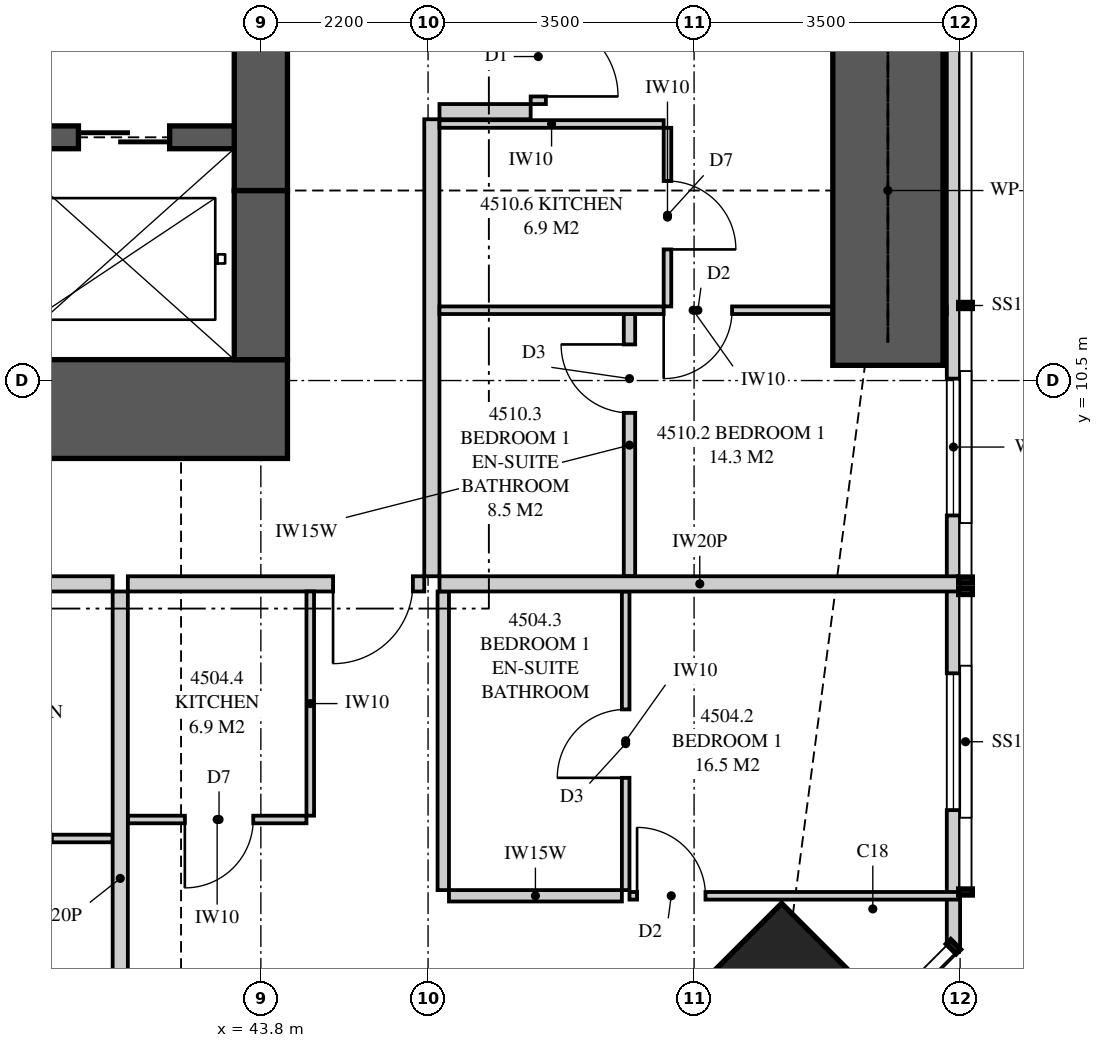
"""IFC4 building model, lengths in metres.
Left out: names, types, materials, properties, quantities, classifications, styles, units other than length and angle.
Written with IfcOpenShell. Run it as: python <this file> out.ifc"""

import sys

from ifc_helpers import new_model, si_unit, direction, frame, frame_2d, origin, origin_2d, place, context, subcontext, project, spatial, polyline, rectangle, outline, extrude, element, fill, save


model = new_model("IFC4")
c1 = context("Model", 3, precision=1e-05, world=origin(), true_north=direction((0.0, 1.0)))
c2 = subcontext(c1, "Body", "Model", "MODEL_VIEW")
j1 = project(units=[si_unit("LENGTHUNIT", "METRE"), si_unit("PLANEANGLEUNIT", "RADIAN")], contexts=[c1])
p1 = place(None, origin())
s1 = spatial("IfcSite", under=j1, at=p1, CompositionType="ELEMENT")
p2 = place(p1, origin())
s2 = spatial("IfcBuilding", under=s1, at=p2, CompositionType="ELEMENT")
p3 = place(p2, frame((0.0, 0.0, 167.75)))
s3 = spatial("IfcBuildingStorey", under=s2, at=p3, CompositionType="ELEMENT", Elevation=167.75)
p4 = place(p3, frame((50.652, 2.348, 0.0), z_axis=(0.0, 0.0, 1.0), x_axis=(0.707106781187, 0.707106781187, 0.0)))
e1 = element("IfcColumn", 1, at=p4, inside=s3, PredefinedType="COLUMN", context=c2, shape_type="SweptSolid", body=[
    extrude(rectangle(XDim=1.8, YDim=1.8, at=origin_2d()), origin(), (0.0, 0.0, 1.0), 3.35),
])
p5 = place(p3, frame((35.9, 10.125, 0.0), z_axis=(0.0, 0.0, 1.0), x_axis=(1.0, 0.0, 0.0)))
e2 = element("IfcWall", 2, at=p5, inside=s3, PredefinedType="SHEAR", context=c2, shape_type="SweptSolid", body=[
    extrude(rectangle(XDim=8.25, YDim=1.3, at=frame_2d((4.125, 0.0))), origin(), (0.0, 0.0, 1.0), 3.35),
])
p6 = place(p5, frame((2.7, 0.0, 0.0)))
e3 = element("IfcOpeningElement", 3, at=p6, cuts=e2, PredefinedType="OPENING", context=c2, shape_type="SweptSolid", body=[
    extrude(rectangle(XDim=1.0, YDim=2.1, at=frame_2d((0.5, 1.05))), frame((0.0, 0.66, 0.0), z_axis=(0.0, -1.0, 0.0), x_axis=(1.0, 0.0, 0.0)), (0.0, 0.0, 1.0), 1.32),
])
p7 = place(p3, frame((43.8, 10.775, 0.0), z_axis=(0.0, 0.0, 1.0), x_axis=(0.0, 1.0, 0.0)))
e4 = element("IfcWall", 4, at=p7, inside=s3, PredefinedType="SHEAR", context=c2, shape_type="SweptSolid", body=[
    extrude(rectangle(XDim=2.225, YDim=0.7, at=frame_2d((1.113, 0.0))), origin(), (0.0, 0.0, 1.0), 3.35),
])
p8 = place(p3, frame((43.8, 13.0, 0.0), z_axis=(0.0, 0.0, 1.0), x_axis=(0.0, 1.0, 0.0)))
e5 = element("IfcWall", 5, at=p8, inside=s3, PredefinedType="SHEAR", context=c2, shape_type="SweptSolid", body=[
    extrude(rectangle(XDim=6.3, YDim=0.7, at=frame_2d((3.15, 0.0))), origin(), (0.0, 0.0, 1.0), 3.35),
])
p9 = place(p8, frame((4.1, 0.0, 0.0)))
e6 = element("IfcOpeningElement", 6, at=p9, cuts=e5, PredefinedType="OPENING", context=c2, shape_type="SweptSolid", body=[
    extrude(rectangle(XDim=1.2, YDim=2.2, at=frame_2d((0.6, 1.1))), frame((0.0, 0.36, 0.0), z_axis=(0.0, -1.0, 0.0), x_axis=(1.0, 0.0, 0.0)), (0.0, 0.0, 1.0), 0.72),
])
p10 = place(p3, frame((40.2, 13.7, 0.0), z_axis=(0.0, 0.0, 1.0), x_axis=(1.0, 0.0, 0.0)))
e7 = element("IfcWall", 7, at=p10, inside=s3, PredefinedType="SHEAR", context=c2, shape_type="SweptSolid", body=[
    extrude(rectangle(XDim=3.6, YDim=0.3, at=frame_2d((1.8, 0.0))), origin(), (0.0, 0.0, 1.0), 3.35),
])
p11 = place(p10, frame((1.2, 0.0, 0.0)))
e8 = element("IfcOpeningElement", 8, at=p11, cuts=e7, PredefinedType="OPENING", context=c2, shape_type="SweptSolid", body=[
    extrude(rectangle(XDim=1.2, YDim=2.1, at=frame_2d((0.6, 1.05))), frame((0.0, 0.16, 0.0), z_axis=(0.0, -1.0, 0.0), x_axis=(1.0, 0.0, 0.0)), (0.0, 0.0, 1.0), 0.32),
])
p12 = place(p3, frame((52.913, 3.051, 0.0), z_axis=(0.0, 0.0, 1.0), x_axis=(0.0, 1.0, 0.0)))
e9 = element("IfcWall", 9, at=p12, inside=s3, PredefinedType="SOLIDWALL", context=c2, shape_type="SweptSolid", body=[
    extrude(outline(polyline([(0.0, 0.0), (29.897, 0.0), (29.897, 3.11), (22.167, 3.11), (22.167, 2.15), (22.074, 2.15), (22.074, 3.11), (21.949, 3.11), (21.949, 2.15), (9.949, 2.15), (9.949, 3.11), (9.847, 3.11), (9.847, 2.15), (9.706, 2.15), (9.706, 3.11), (0.0, 3.11), (0.0, 0.0)])), frame((0.0, 0.087, 0.0), z_axis=(0.0, -1.0, 0.0), x_axis=(1.0, 0.0, 0.0)), (0.0, 0.0, 1.0), 0.175),
])
p13 = place(p12, frame((1.797, 0.0, 0.4)))
e10 = element("IfcOpeningElement", 10, at=p13, cuts=e9, PredefinedType="OPENING", context=c2, shape_type="SweptSolid", body=[
    extrude(rectangle(XDim=1.8, YDim=1.7, at=frame_2d((0.9, 0.85))), frame((0.0, 0.097, 0.0), z_axis=(0.0, -1.0, 0.0), x_axis=(1.0, 0.0, 0.0)), (0.0, 0.0, 1.0), 0.195),
])
p14 = place(p12, frame((5.674, 0.0, 0.4)))
e11 = element("IfcOpeningElement", 11, at=p14, cuts=e9, PredefinedType="OPENING", context=c2, shape_type="SweptSolid", body=[
    extrude(rectangle(XDim=1.8, YDim=1.7, at=frame_2d((0.9, 0.85))), frame((0.0, 0.097, 0.0), z_axis=(0.0, -1.0, 0.0), x_axis=(1.0, 0.0, 0.0)), (0.0, 0.0, 1.0), 0.195),
])
p15 = place(p12, frame((12.349, 0.0, 0.4)))
e12 = element("IfcOpeningElement", 12, at=p15, cuts=e9, PredefinedType="OPENING", context=c2, shape_type="SweptSolid", body=[
    extrude(rectangle(XDim=2.4, YDim=1.7, at=frame_2d((1.2, 0.85))), frame((0.0, 0.097, 0.0), z_axis=(0.0, -1.0, 0.0), x_axis=(1.0, 0.0, 0.0)), (0.0, 0.0, 1.0), 0.195),
])
p16 = place(p12, frame((15.274, 0.0, 0.0)))
e13 = element("IfcOpeningElement", 13, at=p16, cuts=e9, PredefinedType="OPENING", context=c2, shape_type="SweptSolid", body=[
    extrude(rectangle(XDim=1.8, YDim=2.1, at=frame_2d((0.9, 1.05))), frame((0.0, 0.097, 0.0), z_axis=(0.0, -1.0, 0.0), x_axis=(1.0, 0.0, 0.0)), (0.0, 0.0, 1.0), 0.195),
])
p17 = place(p12, frame((24.373, 0.0, 0.4)))
e14 = element("IfcOpeningElement", 14, at=p17, cuts=e9, PredefinedType="OPENING", context=c2, shape_type="SweptSolid", body=[
    extrude(rectangle(XDim=1.2, YDim=1.7, at=frame_2d((0.6, 0.85))), frame((0.0, 0.097, 0.0), z_axis=(0.0, -1.0, 0.0), x_axis=(1.0, 0.0, 0.0)), (0.0, 0.0, 1.0), 0.195),
])
p18 = place(p12, frame((26.801, 0.0, 0.4)))
e15 = element("IfcOpeningElement", 15, at=p18, cuts=e9, PredefinedType="OPENING", context=c2, shape_type="SweptSolid", body=[
    extrude(rectangle(XDim=1.8, YDim=1.7, at=frame_2d((0.9, 0.85))), frame((0.0, 0.097, 0.0), z_axis=(0.0, -1.0, 0.0), x_axis=(1.0, 0.0, 0.0)), (0.0, 0.0, 1.0), 0.195),
])
p19 = place(p3, frame((41.95, 0.175, 0.0), z_axis=(0.0, 0.0, 1.0), x_axis=(0.0, 1.0, 0.0)))
e16 = element("IfcWall", 16, at=p19, inside=s3, PredefinedType="PARTITIONING", context=c2, shape_type="SweptSolid", body=[
    extrude(outline(polyline([(0.529, 2.15), (0.0, 2.15), (0.0, 0.0), (0.529, 0.0), (0.529, 0.876), (1.021, 0.876), (1.021, 0.0), (7.55, 0.0), (7.55, 3.11), (1.685, 3.11), (1.685, 2.15), (1.021, 2.15), (1.021, 1.274), (0.529, 1.274), (0.529, 2.15)])), frame((0.0, 0.1, 0.0), z_axis=(0.0, -1.0, 0.0), x_axis=(1.0, 0.0, 0.0)), (0.0, 0.0, 1.0), 0.2),
])
p20 = place(p3, frame((42.05, 7.825, 0.0), z_axis=(0.0, 0.0, 1.0), x_axis=(1.0, 0.0, 0.0)))
e17 = element("IfcWall", 17, at=p20, inside=s3, PredefinedType="PARTITIONING", context=c2, shape_type="SweptSolid", body=[
    extrude(outline(polyline([(0.0, 0.0), (3.9, 0.0), (3.9, 3.11), (1.037, 3.11), (1.037, 2.541), (0.363, 2.541), (0.363, 3.11), (0.0, 3.11), (0.0, 0.0)])), frame((0.0, 0.1, 0.0), z_axis=(0.0, -1.0, 0.0), x_axis=(1.0, 0.0, 0.0)), (0.0, 0.0, 1.0), 0.2),
])
p21 = place(p20, frame((2.7, 0.0, 0.0)))
e18 = element("IfcOpeningElement", 18, at=p21, cuts=e17, PredefinedType="OPENING", context=c2, shape_type="SweptSolid", body=[
    extrude(rectangle(XDim=1.05, YDim=2.2, at=frame_2d((0.525, 1.1))), frame((0.0, 0.11, 0.0), z_axis=(0.0, -1.0, 0.0), x_axis=(1.0, 0.0, 0.0)), (0.0, 0.0, 1.0), 0.22),
])
p22 = place(p3, frame((48.6, 3.796, 0.0), z_axis=(0.0, 0.0, 1.0), x_axis=(0.0, 1.0, 0.0)))
e19 = element("IfcWall", 19, at=p22, inside=s3, PredefinedType="PARTITIONING", context=c2, shape_type="SweptSolid", body=[
    extrude(rectangle(XDim=3.929, YDim=0.1, at=frame_2d((1.964, 0.0))), origin(), (0.0, 0.0, 1.0), 3.11),
])
p23 = place(p22, frame((1.477, 0.0, 0.0)))
e20 = element("IfcOpeningElement", 20, at=p23, cuts=e19, PredefinedType="OPENING", context=c2, shape_type="SweptSolid", body=[
    extrude(rectangle(XDim=0.9, YDim=2.1, at=frame_2d((0.45, 1.05))), frame((0.0, 0.06, 0.0), z_axis=(0.0, -1.0, 0.0), x_axis=(1.0, 0.0, 0.0)), (0.0, 0.0, 1.0), 0.12),
])
p24 = place(p3, frame((48.65, 3.721, 0.0), z_axis=(0.0, 0.0, 1.0), x_axis=(1.0, 0.0, 0.0)))
e21 = element("IfcWall", 21, at=p24, inside=s3, PredefinedType="PARTITIONING", context=c2, shape_type="SweptSolid", body=[
    extrude(outline(polyline([(0.0, 0.0), (4.35, 0.0), (4.35, 3.11), (3.049, 3.11), (3.049, 2.15), (1.314, 2.15), (1.314, 3.11), (0.0, 3.11), (0.0, 0.0)])), frame((0.0, 0.05, 0.0), z_axis=(0.0, -1.0, 0.0), x_axis=(1.0, 0.0, 0.0)), (0.0, 0.0, 1.0), 0.1),
])
p25 = place(p24, frame((0.1, 0.0, 0.0)))
e22 = element("IfcOpeningElement", 22, at=p25, cuts=e21, PredefinedType="OPENING", context=c2, shape_type="SweptSolid", body=[
    extrude(rectangle(XDim=0.9, YDim=2.1, at=frame_2d((0.45, 1.05))), frame((0.0, 0.06, 0.0), z_axis=(0.0, -1.0, 0.0), x_axis=(1.0, 0.0, 0.0)), (0.0, 0.0, 1.0), 0.12),
])
p26 = place(p3, frame((46.275, 3.721, 0.0), z_axis=(0.0, 0.0, 1.0), x_axis=(1.0, 0.0, 0.0)))
e23 = element("IfcWall", 23, at=p26, inside=s3, PredefinedType="PLUMBINGWALL", context=c2, shape_type="SweptSolid", body=[
    extrude(rectangle(XDim=2.275, YDim=0.15, at=frame_2d((1.138, 0.0))), origin(), (0.0, 0.0, 1.0), 3.11),
])
p27 = place(p3, frame((46.2, 3.796, 0.0), z_axis=(0.0, 0.0, 1.0), x_axis=(0.0, 1.0, 0.0)))
e24 = element("IfcWall", 24, at=p27, inside=s3, PredefinedType="PLUMBINGWALL", context=c2, shape_type="SweptSolid", body=[
    extrude(rectangle(XDim=3.929, YDim=0.15, at=frame_2d((1.964, 0.0))), origin(), (0.0, 0.0, 1.0), 3.11),
])
p28 = place(p3, frame((42.05, 4.725, 0.0), z_axis=(0.0, 0.0, 1.0), x_axis=(1.0, 0.0, 0.0)))
e25 = element("IfcWall", 25, at=p28, inside=s3, PredefinedType="PARTITIONING", context=c2, shape_type="SweptSolid", body=[
    extrude(outline(polyline([(0.0, 0.0), (2.35, 0.0), (2.35, 3.11), (0.987, 3.11), (0.987, 2.541), (0.413, 2.541), (0.413, 3.11), (0.0, 3.11), (0.0, 0.0)])), frame((0.0, 0.05, 0.0), z_axis=(0.0, -1.0, 0.0), x_axis=(1.0, 0.0, 0.0)), (0.0, 0.0, 1.0), 0.1),
])
p29 = place(p28, frame((0.75, 0.0, 0.0)))
e26 = element("IfcOpeningElement", 26, at=p29, cuts=e25, PredefinedType="OPENING", context=c2, shape_type="SweptSolid", body=[
    extrude(rectangle(XDim=0.9, YDim=2.1, at=frame_2d((0.45, 1.05))), frame((0.0, 0.06, 0.0), z_axis=(0.0, -1.0, 0.0), x_axis=(1.0, 0.0, 0.0)), (0.0, 0.0, 1.0), 0.12),
])
p30 = place(p3, frame((44.45, 4.775, 0.0), z_axis=(0.0, 0.0, 1.0), x_axis=(0.0, 1.0, 0.0)))
e27 = element("IfcWall", 27, at=p30, inside=s3, PredefinedType="PARTITIONING", context=c2, shape_type="SweptSolid", body=[
    extrude(rectangle(XDim=2.95, YDim=0.1, at=frame_2d((1.475, 0.0))), origin(), (0.0, 0.0, 1.0), 3.11),
])
p31 = place(p3, frame((46.15, 7.825, 0.0), z_axis=(0.0, 0.0, 1.0), x_axis=(1.0, 0.0, 0.0)))
e28 = element("IfcWall", 28, at=p31, inside=s3, PredefinedType="PARTITIONING", context=c2, shape_type="SweptSolid", body=[
    extrude(outline(polyline([(0.0, 0.0), (6.85, 0.0), (6.85, 3.11), (6.138, 3.11), (6.138, 2.15), (4.303, 2.15), (4.303, 3.11), (0.0, 3.11), (0.0, 0.0)])), frame((0.0, 0.1, 0.0), z_axis=(0.0, -1.0, 0.0), x_axis=(1.0, 0.0, 0.0)), (0.0, 0.0, 1.0), 0.2),
])
p32 = place(p3, frame((46.05, 7.925, 0.0), z_axis=(0.0, 0.0, 1.0), x_axis=(0.0, 1.0, 0.0)))
e29 = element("IfcWall", 29, at=p32, inside=s3, PredefinedType="PARTITIONING", context=c2, shape_type="SweptSolid", body=[
    extrude(outline(polyline([(0.0, 0.0), (6.012, 0.0), (6.012, 3.11), (5.412, 3.11), (5.412, 2.541), (4.738, 2.541), (4.738, 3.11), (0.0, 3.11), (0.0, 0.0)])), frame((0.0, 0.1, 0.0), z_axis=(0.0, -1.0, 0.0), x_axis=(1.0, 0.0, 0.0)), (0.0, 0.0, 1.0), 0.2),
])
p33 = place(p3, frame((52.825, 11.425, 0.0), z_axis=(0.0, 0.0, 1.0), x_axis=(-1.0, 0.0, 0.0)))
e30 = element("IfcWall", 30, at=p33, inside=s3, PredefinedType="PARTITIONING", context=c2, shape_type="SweptSolid", body=[
    extrude(outline(polyline([(0.115, 3.11), (0.0, 3.11), (0.0, 0.0), (0.529, 0.0), (0.529, 0.186), (1.021, 0.186), (1.021, 0.0), (6.675, 0.0), (6.675, 3.11), (1.849, 3.11), (1.849, 2.15), (1.021, 2.15), (1.021, 1.965), (0.529, 1.965), (0.529, 2.15), (0.115, 2.15), (0.115, 3.11)])), frame((0.0, 0.05, 0.0), z_axis=(0.0, -1.0, 0.0), x_axis=(1.0, 0.0, 0.0)), (0.0, 0.0, 1.0), 0.1),
])
p34 = place(p33, frame((2.825, 0.0, 0.0)))
e31 = element("IfcOpeningElement", 31, at=p34, cuts=e30, PredefinedType="OPENING", context=c2, shape_type="SweptSolid", body=[
    extrude(rectangle(XDim=0.9, YDim=2.1, at=frame_2d((0.45, 1.05))), frame((0.0, 0.06, 0.0), z_axis=(0.0, -1.0, 0.0), x_axis=(1.0, 0.0, 0.0)), (0.0, 0.0, 1.0), 0.12),
])
p35 = place(p3, frame((48.65, 7.925, 0.0), z_axis=(0.0, 0.0, 1.0), x_axis=(0.0, 1.0, 0.0)))
e32 = element("IfcWall", 32, at=p35, inside=s3, PredefinedType="PLUMBINGWALL", context=c2, shape_type="SweptSolid", body=[
    extrude(rectangle(XDim=3.45, YDim=0.15, at=frame_2d((1.725, 0.0))), origin(), (0.0, 0.0, 1.0), 3.11),
])
p36 = place(p35, frame((2.15, 0.0, 0.0)))
e33 = element("IfcOpeningElement", 33, at=p36, cuts=e32, PredefinedType="OPENING", context=c2, shape_type="SweptSolid", body=[
    extrude(rectangle(XDim=0.9, YDim=2.1, at=frame_2d((0.45, 1.05))), frame((0.0, 0.085, 0.0), z_axis=(0.0, -1.0, 0.0), x_axis=(1.0, 0.0, 0.0)), (0.0, 0.0, 1.0), 0.17),
])
p37 = place(p3, frame((49.15, 11.475, 0.0), z_axis=(0.0, 0.0, 1.0), x_axis=(0.0, 1.0, 0.0)))
e34 = element("IfcWall", 34, at=p37, inside=s3, PredefinedType="PARTITIONING", context=c2, shape_type="SweptSolid", body=[
    extrude(outline(polyline([(0.0, 0.0), (2.35, 0.0), (2.35, 3.11), (1.812, 3.11), (1.812, 2.541), (1.238, 2.541), (1.238, 3.11), (0.0, 3.11), (0.0, 0.0)])), frame((0.0, 0.05, 0.0), z_axis=(0.0, -1.0, 0.0), x_axis=(1.0, 0.0, 0.0)), (0.0, 0.0, 1.0), 0.1),
])
p38 = place(p37, frame((0.75, 0.0, 0.0)))
e35 = element("IfcOpeningElement", 35, at=p38, cuts=e34, PredefinedType="OPENING", context=c2, shape_type="SweptSolid", body=[
    extrude(rectangle(XDim=0.9, YDim=2.1, at=frame_2d((0.45, 1.05))), frame((0.0, 0.06, 0.0), z_axis=(0.0, -1.0, 0.0), x_axis=(1.0, 0.0, 0.0)), (0.0, 0.0, 1.0), 0.12),
])
p39 = place(p3, frame((49.1, 13.875, 0.0), z_axis=(0.0, 0.0, 1.0), x_axis=(-1.0, 0.0, 0.0)))
e36 = element("IfcWall", 36, at=p39, inside=s3, PredefinedType="PARTITIONING", context=c2, shape_type="SweptSolid", body=[
    extrude(rectangle(XDim=2.95, YDim=0.1, at=frame_2d((1.475, 0.0))), origin(), (0.0, 0.0, 1.0), 3.11),
])
p40 = place(p3, frame((39.175, 7.825, 0.0), z_axis=(0.0, 0.0, 1.0), x_axis=(1.0, 0.0, 0.0)))
e37 = element("IfcWall", 37, at=p40, inside=s3, PredefinedType="PARTITIONING", context=c2, shape_type="SweptSolid", body=[
    extrude(rectangle(XDim=2.675, YDim=0.2, at=frame_2d((1.337, 0.0))), origin(), (0.0, 0.0, 1.0), 3.11),
])
p41 = place(p3, frame((47.45, 14.137, 0.0), z_axis=(0.0, 0.0, 1.0), x_axis=(0.0, 1.0, 0.0)))
e38 = element("IfcWall", 38, at=p41, inside=s3, PredefinedType="PARTITIONING", context=c2, shape_type="SweptSolid", body=[
    extrude(rectangle(XDim=2.4, YDim=0.2, at=frame_2d((1.2, 0.0))), origin(), (0.0, 0.0, 1.0), 3.11),
])
p42 = place(p41, frame((0.1, 0.0, 0.0)))
e39 = element("IfcOpeningElement", 39, at=p42, cuts=e38, PredefinedType="OPENING", context=c2, shape_type="SweptSolid", body=[
    extrude(rectangle(XDim=1.05, YDim=2.2, at=frame_2d((0.525, 1.1))), frame((0.0, 0.11, 0.0), z_axis=(0.0, -1.0, 0.0), x_axis=(1.0, 0.0, 0.0)), (0.0, 0.0, 1.0), 0.22),
])
p43 = place(p3, frame((46.15, 14.038, 0.0), z_axis=(0.0, 0.0, 1.0), x_axis=(1.0, 0.0, 0.0)))
e40 = element("IfcWall", 40, at=p43, inside=s3, PredefinedType="PARTITIONING", context=c2, shape_type="SweptSolid", body=[
    extrude(rectangle(XDim=1.2, YDim=0.2, at=frame_2d((0.6, 0.0))), origin(), (0.0, 0.0, 1.0), 3.11),
])
p44 = place(p3, frame((41.85, 4.475, 0.0), z_axis=(0.0, 0.0, 1.0), x_axis=(-1.0, 0.0, 0.0)))
e41 = element("IfcWall", 41, at=p44, inside=s3, PredefinedType="PARTITIONING", context=c2, shape_type="SweptSolid", body=[
    extrude(rectangle(XDim=2.5, YDim=0.1, at=frame_2d((1.25, 0.0))), origin(), (0.0, 0.0, 1.0), 3.11),
])
p45 = place(p44, frame((0.8, 0.0, 0.0)))
e42 = element("IfcOpeningElement", 42, at=p45, cuts=e41, PredefinedType="OPENING", context=c2, shape_type="SweptSolid", body=[
    extrude(rectangle(XDim=0.9, YDim=2.1, at=frame_2d((0.45, 1.05))), frame((0.0, 0.06, 0.0), z_axis=(0.0, -1.0, 0.0), x_axis=(1.0, 0.0, 0.0)), (0.0, 0.0, 1.0), 0.12),
])
p46 = place(p3, frame((52.05, 10.7, 0.0), z_axis=(0.0, 0.0, 1.0), x_axis=(0.0, 1.0, 0.0)))
e43 = element("IfcWall", 43, at=p46, inside=s3, PredefinedType="SHEAR", context=c2, shape_type="SweptSolid", body=[
    extrude(rectangle(XDim=4.6, YDim=1.45, at=frame_2d((2.3, 0.0))), origin(), (0.0, 0.0, 1.0), 3.35),
])
p47 = place(p13, origin())
e44 = element("IfcWindow", 44, at=p47, inside=s3, PartitioningType="SINGLE_PANEL", PredefinedType="WINDOW", context=c2, shape_type="SweptSolid", body=[
    extrude(rectangle(XDim=1.8, YDim=1.7, at=frame_2d((0.9, 0.85))), frame((0.0, 0.03, 0.0), z_axis=(0.0, -1.0, 0.0), x_axis=(1.0, 0.0, 0.0)), (0.0, 0.0, 1.0), 0.06),
])
fill(e10, e44)
p48 = place(p14, origin())
e45 = element("IfcWindow", 45, at=p48, inside=s3, PartitioningType="SINGLE_PANEL", PredefinedType="WINDOW", context=c2, shape_type="SweptSolid", body=[
    extrude(rectangle(XDim=1.8, YDim=1.7, at=frame_2d((0.9, 0.85))), frame((0.0, 0.03, 0.0), z_axis=(0.0, -1.0, 0.0), x_axis=(1.0, 0.0, 0.0)), (0.0, 0.0, 1.0), 0.06),
])
fill(e11, e45)
p49 = place(p21, frame((1.05, 0.0, 0.0), z_axis=(0.0, 0.0, 1.0), x_axis=(-1.0, 0.0, 0.0)))
e46 = element("IfcDoor", 46, at=p49, inside=s3, OperationType="SINGLE_SWING_RIGHT", PredefinedType="DOOR", context=c2, shape_type="SweptSolid", body=[
    extrude(rectangle(XDim=1.05, YDim=2.2, at=frame_2d((0.525, 1.1))), frame((0.0, 0.025, 0.0), z_axis=(0.0, -1.0, 0.0), x_axis=(1.0, 0.0, 0.0)), (0.0, 0.0, 1.0), 0.05),
])
fill(e18, e46)
p50 = place(p25, origin())
e47 = element("IfcDoor", 47, at=p50, inside=s3, OperationType="SINGLE_SWING_LEFT", PredefinedType="DOOR", context=c2, shape_type="SweptSolid", body=[
    extrude(rectangle(XDim=0.9, YDim=2.1, at=frame_2d((0.45, 1.05))), frame((0.0, 0.025, 0.0), z_axis=(0.0, -1.0, 0.0), x_axis=(1.0, 0.0, 0.0)), (0.0, 0.0, 1.0), 0.05),
])
fill(e22, e47)
p51 = place(p23, origin())
e48 = element("IfcDoor", 48, at=p51, inside=s3, OperationType="SINGLE_SWING_LEFT", PredefinedType="DOOR", context=c2, shape_type="SweptSolid", body=[
    extrude(rectangle(XDim=0.9, YDim=2.1, at=frame_2d((0.45, 1.05))), frame((0.0, 0.025, 0.0), z_axis=(0.0, -1.0, 0.0), x_axis=(1.0, 0.0, 0.0)), (0.0, 0.0, 1.0), 0.05),
])
fill(e20, e48)
p52 = place(p29, frame((0.9, 0.0, 0.0), z_axis=(0.0, 0.0, 1.0), x_axis=(-1.0, 0.0, 0.0)))
e49 = element("IfcDoor", 49, at=p52, inside=s3, OperationType="SINGLE_SWING_RIGHT", PredefinedType="DOOR", context=c2, shape_type="SweptSolid", body=[
    extrude(rectangle(XDim=0.9, YDim=2.1, at=frame_2d((0.45, 1.05))), frame((0.0, 0.025, 0.0), z_axis=(0.0, -1.0, 0.0), x_axis=(1.0, 0.0, 0.0)), (0.0, 0.0, 1.0), 0.05),
])
fill(e26, e49)
p53 = place(p42, frame((1.05, 0.0, 0.0), z_axis=(0.0, 0.0, 1.0), x_axis=(-1.0, 0.0, 0.0)))
e50 = element("IfcDoor", 50, at=p53, inside=s3, OperationType="SINGLE_SWING_RIGHT", PredefinedType="DOOR", context=c2, shape_type="SweptSolid", body=[
    extrude(rectangle(XDim=1.05, YDim=2.2, at=frame_2d((0.525, 1.1))), frame((0.0, 0.025, 0.0), z_axis=(0.0, -1.0, 0.0), x_axis=(1.0, 0.0, 0.0)), (0.0, 0.0, 1.0), 0.05),
])
fill(e39, e50)
p54 = place(p34, origin())
e51 = element("IfcDoor", 51, at=p54, inside=s3, OperationType="SINGLE_SWING_RIGHT", PredefinedType="DOOR", context=c2, shape_type="SweptSolid", body=[
    extrude(rectangle(XDim=0.9, YDim=2.1, at=frame_2d((0.45, 1.05))), frame((0.0, 0.025, 0.0), z_axis=(0.0, -1.0, 0.0), x_axis=(1.0, 0.0, 0.0)), (0.0, 0.0, 1.0), 0.05),
])
fill(e31, e51)
p55 = place(p36, origin())
e52 = element("IfcDoor", 52, at=p55, inside=s3, OperationType="SINGLE_SWING_RIGHT", PredefinedType="DOOR", context=c2, shape_type="SweptSolid", body=[
    extrude(rectangle(XDim=0.9, YDim=2.1, at=frame_2d((0.45, 1.05))), frame((0.0, 0.025, 0.0), z_axis=(0.0, -1.0, 0.0), x_axis=(1.0, 0.0, 0.0)), (0.0, 0.0, 1.0), 0.05),
])
fill(e33, e52)
p56 = place(p38, frame((0.9, 0.0, 0.0), z_axis=(0.0, 0.0, 1.0), x_axis=(-1.0, 0.0, 0.0)))
e53 = element("IfcDoor", 53, at=p56, inside=s3, OperationType="SINGLE_SWING_RIGHT", PredefinedType="DOOR", context=c2, shape_type="SweptSolid", body=[
    extrude(rectangle(XDim=0.9, YDim=2.1, at=frame_2d((0.45, 1.05))), frame((0.0, 0.025, 0.0), z_axis=(0.0, -1.0, 0.0), x_axis=(1.0, 0.0, 0.0)), (0.0, 0.0, 1.0), 0.05),
])
fill(e35, e53)
p57 = place(p11, origin())
e54 = element("IfcDoor", 54, at=p57, inside=s3, OperationType="SLIDING_TO_LEFT", PredefinedType="DOOR", context=c2, shape_type="SweptSolid", body=[
    extrude(rectangle(XDim=1.2, YDim=2.1, at=frame_2d((0.6, 1.05))), frame((0.0, 0.025, 0.0), z_axis=(0.0, -1.0, 0.0), x_axis=(1.0, 0.0, 0.0)), (0.0, 0.0, 1.0), 0.05),
])
fill(e8, e54)
save(model, sys.argv[1])
